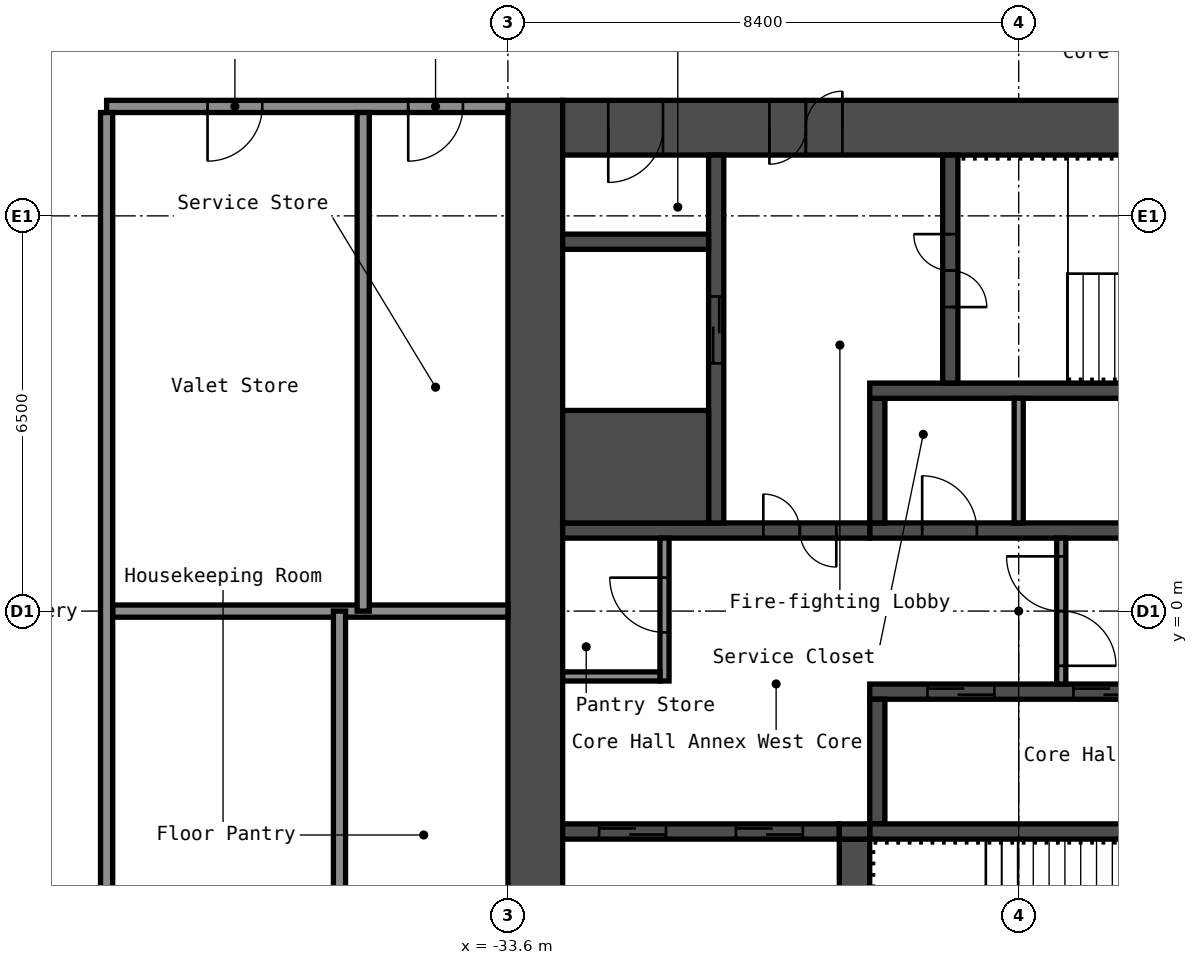
"""IFC4 building model, lengths in metres.
Left out: names, types, materials, properties, quantities, classifications, styles, units other than length and angle.
Written with IfcOpenShell. Run it as: python <this file> out.ifc"""

import sys

from ifc_helpers import new_model, si_unit, direction, frame, frame_2d, origin, place, context, subcontext, project, spatial, rectangle, extrude, element, fill, save


model = new_model("IFC4")
c1 = context("Model", 3, precision=1e-05, world=origin(), true_north=direction((0.0, 1.0)))
c2 = subcontext(c1, "Body", "Model", "MODEL_VIEW")
j1 = project(units=[si_unit("LENGTHUNIT", "METRE"), si_unit("PLANEANGLEUNIT", "RADIAN")], contexts=[c1])
p1 = place(None, origin())
s1 = spatial("IfcSite", under=j1, at=p1, CompositionType="ELEMENT")
p2 = place(p1, origin())
s2 = spatial("IfcBuilding", under=s1, at=p2, CompositionType="ELEMENT")
p3 = place(p2, frame((0.0, 0.0, 143.8)))
s3 = spatial("IfcBuildingStorey", under=s2, at=p3, CompositionType="ELEMENT", Elevation=143.8)
p4 = place(p3, frame((-33.15, -8.4, 0.0), z_axis=(0.0, 0.0, 1.0), x_axis=(0.0, 1.0, 0.0)))
e1 = element("IfcWall", 1, at=p4, inside=s3, PredefinedType="SHEAR", context=c2, shape_type="SweptSolid", body=[
    extrude(rectangle(XDim=16.8, YDim=0.9, at=frame_2d((8.4, 0.0))), origin(), (0.0, 0.0, 1.0), 2.75),
])
p5 = place(p3, frame((-32.7, 7.95, 0.0), z_axis=(0.0, 0.0, 1.0), x_axis=(1.0, 0.0, 0.0)))
e2 = element("IfcWall", 2, at=p5, inside=s3, PredefinedType="SHEAR", context=c2, shape_type="SweptSolid", body=[
    extrude(rectangle(XDim=15.0, YDim=0.9, at=frame_2d((7.5, 0.0))), origin(), (0.0, 0.0, 1.0), 2.75),
])
p6 = place(p5, frame((3.4, 0.0, 0.0)))
e3 = element("IfcOpeningElement", 3, at=p6, cuts=e2, PredefinedType="OPENING", context=c2, shape_type="SweptSolid", body=[
    extrude(rectangle(XDim=1.2, YDim=2.1, at=frame_2d((0.6, 1.05))), frame((0.0, 0.46, 0.0), z_axis=(0.0, -1.0, 0.0), x_axis=(1.0, 0.0, 0.0)), (0.0, 0.0, 1.0), 0.92),
])
p7 = place(p5, frame((0.75, 0.0, 0.0)))
e4 = element("IfcOpeningElement", 4, at=p7, cuts=e2, PredefinedType="OPENING", context=c2, shape_type="SweptSolid", body=[
    extrude(rectangle(XDim=0.9, YDim=2.1, at=frame_2d((0.45, 1.05))), frame((0.0, 0.46, 0.0), z_axis=(0.0, -1.0, 0.0), x_axis=(1.0, 0.0, 0.0)), (0.0, 0.0, 1.0), 0.92),
])
p8 = place(p3, frame((-27.65, 1.325, 0.0), z_axis=(0.0, 0.0, 1.0), x_axis=(1.0, 0.0, 0.0)))
e5 = element("IfcWall", 5, at=p8, inside=s3, PredefinedType="SHEAR", context=c2, shape_type="SweptSolid", body=[
    extrude(rectangle(XDim=7.5, YDim=0.25, at=frame_2d((3.75, 0.0))), origin(), (0.0, 0.0, 1.0), 2.75),
])
p9 = place(p8, frame((4.562, 0.0, 0.0)))
e6 = element("IfcOpeningElement", 6, at=p9, cuts=e5, PredefinedType="OPENING", context=c2, shape_type="SweptSolid", body=[
    extrude(rectangle(XDim=0.9, YDim=2.1, at=frame_2d((0.45, 1.05))), frame((0.0, 0.135, 0.0), z_axis=(0.0, -1.0, 0.0), x_axis=(1.0, 0.0, 0.0)), (0.0, 0.0, 1.0), 0.27),
])
p10 = place(p8, frame((0.863, 0.0, 0.0)))
e7 = element("IfcOpeningElement", 7, at=p10, cuts=e5, PredefinedType="OPENING", context=c2, shape_type="SweptSolid", body=[
    extrude(rectangle(XDim=0.9, YDim=2.1, at=frame_2d((0.45, 1.05))), frame((0.0, 0.135, 0.0), z_axis=(0.0, -1.0, 0.0), x_axis=(1.0, 0.0, 0.0)), (0.0, 0.0, 1.0), 0.27),
])
p11 = place(p3, frame((-27.525, 1.45, 0.0), z_axis=(0.0, 0.0, 1.0), x_axis=(0.0, 1.0, 0.0)))
e8 = element("IfcWall", 8, at=p11, inside=s3, PredefinedType="SHEAR", context=c2, shape_type="SweptSolid", body=[
    extrude(rectangle(XDim=2.05, YDim=0.25, at=frame_2d((1.025, 0.0))), origin(), (0.0, 0.0, 1.0), 2.75),
])
p12 = place(p3, frame((-27.65, 3.625, 0.0), z_axis=(0.0, 0.0, 1.0), x_axis=(1.0, 0.0, 0.0)))
e9 = element("IfcWall", 9, at=p12, inside=s3, PredefinedType="SHEAR", context=c2, shape_type="SweptSolid", body=[
    extrude(rectangle(XDim=7.5, YDim=0.25, at=frame_2d((3.75, 0.0))), origin(), (0.0, 0.0, 1.0), 2.75),
])
p13 = place(p3, frame((-26.325, 3.75, 0.0), z_axis=(0.0, 0.0, 1.0), x_axis=(0.0, 1.0, 0.0)))
e10 = element("IfcWall", 10, at=p13, inside=s3, PredefinedType="SHEAR", context=c2, shape_type="SweptSolid", body=[
    extrude(rectangle(XDim=3.75, YDim=0.25, at=frame_2d((1.875, 0.0))), origin(), (0.0, 0.0, 1.0), 2.75),
])
p14 = place(p13, frame((1.25, 0.0, 0.0)))
e11 = element("IfcOpeningElement", 11, at=p14, cuts=e10, PredefinedType="OPENING", context=c2, shape_type="SweptSolid", body=[
    extrude(rectangle(XDim=1.2, YDim=2.1, at=frame_2d((0.6, 1.05))), frame((0.0, 0.135, 0.0), z_axis=(0.0, -1.0, 0.0), x_axis=(1.0, 0.0, 0.0)), (0.0, 0.0, 1.0), 0.27),
])
p15 = place(p3, frame((-32.7, 1.325, 0.0), z_axis=(0.0, 0.0, 1.0), x_axis=(1.0, 0.0, 0.0)))
e12 = element("IfcWall", 12, at=p15, inside=s3, PredefinedType="SHEAR", context=c2, shape_type="SweptSolid", body=[
    extrude(rectangle(XDim=5.05, YDim=0.25, at=frame_2d((2.525, 0.0))), origin(), (0.0, 0.0, 1.0), 2.75),
])
p16 = place(p15, frame((3.3, 0.0, 0.0)))
e13 = element("IfcOpeningElement", 13, at=p16, cuts=e12, PredefinedType="OPENING", context=c2, shape_type="SweptSolid", body=[
    extrude(rectangle(XDim=1.2, YDim=2.1, at=frame_2d((0.6, 1.05))), frame((0.0, 0.135, 0.0), z_axis=(0.0, -1.0, 0.0), x_axis=(1.0, 0.0, 0.0)), (0.0, 0.0, 1.0), 0.27),
])
p17 = place(p3, frame((-30.175, 1.45, 0.0), z_axis=(0.0, 0.0, 1.0), x_axis=(0.0, 1.0, 0.0)))
e14 = element("IfcWall", 14, at=p17, inside=s3, PredefinedType="SHEAR", context=c2, shape_type="SweptSolid", body=[
    extrude(rectangle(XDim=6.05, YDim=0.25, at=frame_2d((3.025, 0.0))), origin(), (0.0, 0.0, 1.0), 2.75),
])
p18 = place(p17, frame((2.625, 0.0, 0.0)))
e15 = element("IfcOpeningElement", 15, at=p18, cuts=e14, PredefinedType="OPENING", context=c2, shape_type="SweptSolid", body=[
    extrude(rectangle(XDim=1.1, YDim=2.1, at=frame_2d((0.55, 1.05))), frame((0.0, 0.135, 0.0), z_axis=(0.0, -1.0, 0.0), x_axis=(1.0, 0.0, 0.0)), (0.0, 0.0, 1.0), 0.27),
])
p19 = place(p3, frame((-32.7, 2.375, 0.0), z_axis=(0.0, 0.0, 1.0), x_axis=(1.0, 0.0, 0.0)))
e16 = element("IfcWall", 16, at=p19, inside=s3, PredefinedType="SHEAR", context=c2, shape_type="SweptSolid", body=[
    extrude(rectangle(XDim=2.4, YDim=1.85, at=frame_2d((1.2, 0.0))), origin(), (0.0, 0.0, 1.0), 2.75),
])
p20 = place(p3, frame((-32.7, 6.075, 0.0), z_axis=(0.0, 0.0, 1.0), x_axis=(1.0, 0.0, 0.0)))
e17 = element("IfcWall", 17, at=p20, inside=s3, PredefinedType="SHEAR", context=c2, shape_type="SweptSolid", body=[
    extrude(rectangle(XDim=2.4, YDim=0.25, at=frame_2d((1.2, 0.0))), origin(), (0.0, 0.0, 1.0), 2.75),
])
p21 = place(p3, frame((-27.65, -1.325, 0.0), z_axis=(0.0, 0.0, 1.0), x_axis=(1.0, 0.0, 0.0)))
e18 = element("IfcWall", 18, at=p21, inside=s3, PredefinedType="SHEAR", context=c2, shape_type="SweptSolid", body=[
    extrude(rectangle(XDim=7.5, YDim=0.25, at=frame_2d((3.75, 0.0))), origin(), (0.0, 0.0, 1.0), 2.75),
])
p22 = place(p21, frame((5.75, 0.0, 0.0)))
e19 = element("IfcOpeningElement", 19, at=p22, cuts=e18, PredefinedType="OPENING", context=c2, shape_type="SweptSolid", body=[
    extrude(rectangle(XDim=1.1, YDim=2.1, at=frame_2d((0.55, 1.05))), frame((0.0, 0.135, 0.0), z_axis=(0.0, -1.0, 0.0), x_axis=(1.0, 0.0, 0.0)), (0.0, 0.0, 1.0), 0.27),
])
p23 = place(p21, frame((3.35, 0.0, 0.0)))
e20 = element("IfcOpeningElement", 20, at=p23, cuts=e18, PredefinedType="OPENING", context=c2, shape_type="SweptSolid", body=[
    extrude(rectangle(XDim=1.1, YDim=2.1, at=frame_2d((0.55, 1.05))), frame((0.0, 0.135, 0.0), z_axis=(0.0, -1.0, 0.0), x_axis=(1.0, 0.0, 0.0)), (0.0, 0.0, 1.0), 0.27),
])
p24 = place(p21, frame((0.95, 0.0, 0.0)))
e21 = element("IfcOpeningElement", 21, at=p24, cuts=e18, PredefinedType="OPENING", context=c2, shape_type="SweptSolid", body=[
    extrude(rectangle(XDim=1.1, YDim=2.1, at=frame_2d((0.55, 1.05))), frame((0.0, 0.135, 0.0), z_axis=(0.0, -1.0, 0.0), x_axis=(1.0, 0.0, 0.0)), (0.0, 0.0, 1.0), 0.27),
])
p25 = place(p3, frame((-27.525, -3.5, 0.0), z_axis=(0.0, 0.0, 1.0), x_axis=(0.0, 1.0, 0.0)))
e22 = element("IfcWall", 22, at=p25, inside=s3, PredefinedType="SHEAR", context=c2, shape_type="SweptSolid", body=[
    extrude(rectangle(XDim=2.05, YDim=0.25, at=frame_2d((1.025, 0.0))), origin(), (0.0, 0.0, 1.0), 2.75),
])
p26 = place(p3, frame((-27.65, -3.625, 0.0), z_axis=(0.0, 0.0, 1.0), x_axis=(1.0, 0.0, 0.0)))
e23 = element("IfcWall", 23, at=p26, inside=s3, PredefinedType="SHEAR", context=c2, shape_type="SweptSolid", body=[
    extrude(rectangle(XDim=7.5, YDim=0.25, at=frame_2d((3.75, 0.0))), origin(), (0.0, 0.0, 1.0), 2.75),
])
p27 = place(p3, frame((-27.9, -7.5, 0.0), z_axis=(0.0, 0.0, 1.0), x_axis=(0.0, 1.0, 0.0)))
e24 = element("IfcWall", 24, at=p27, inside=s3, PredefinedType="SHEAR", context=c2, shape_type="SweptSolid", body=[
    extrude(rectangle(XDim=3.75, YDim=0.5, at=frame_2d((1.875, 0.0))), origin(), (0.0, 0.0, 1.0), 2.75),
])
p28 = place(p3, frame((-32.7, -3.625, 0.0), z_axis=(0.0, 0.0, 1.0), x_axis=(1.0, 0.0, 0.0)))
e25 = element("IfcWall", 25, at=p28, inside=s3, PredefinedType="SHEAR", context=c2, shape_type="SweptSolid", body=[
    extrude(rectangle(XDim=4.55, YDim=0.25, at=frame_2d((2.275, 0.0))), origin(), (0.0, 0.0, 1.0), 2.75),
])
p29 = place(p28, frame((2.85, 0.0, 0.0)))
e26 = element("IfcOpeningElement", 26, at=p29, cuts=e25, PredefinedType="OPENING", context=c2, shape_type="SweptSolid", body=[
    extrude(rectangle(XDim=1.1, YDim=2.1, at=frame_2d((0.55, 1.05))), frame((0.0, 0.135, 0.0), z_axis=(0.0, -1.0, 0.0), x_axis=(1.0, 0.0, 0.0)), (0.0, 0.0, 1.0), 0.27),
])
p30 = place(p28, frame((0.6, 0.0, 0.0)))
e27 = element("IfcOpeningElement", 27, at=p30, cuts=e25, PredefinedType="OPENING", context=c2, shape_type="SweptSolid", body=[
    extrude(rectangle(XDim=1.1, YDim=2.1, at=frame_2d((0.55, 1.05))), frame((0.0, 0.135, 0.0), z_axis=(0.0, -1.0, 0.0), x_axis=(1.0, 0.0, 0.0)), (0.0, 0.0, 1.0), 0.27),
])
p31 = place(p3, frame((-28.15, -3.625, 0.0), z_axis=(0.0, 0.0, 1.0), x_axis=(1.0, 0.0, 0.0)))
e28 = element("IfcWall", 28, at=p31, inside=s3, PredefinedType="SHEAR", context=c2, shape_type="SweptSolid", body=[
    extrude(rectangle(XDim=0.5, YDim=0.25, at=frame_2d((0.25, 0.0))), origin(), (0.0, 0.0, 1.0), 2.75),
])
p32 = place(p3, frame((-24.5, -1.2, 0.0), z_axis=(0.0, 0.0, 1.0), x_axis=(0.0, 1.0, 0.0)))
e29 = element("IfcWall", 29, at=p32, inside=s3, PredefinedType="PARTITIONING", context=c2, shape_type="SweptSolid", body=[
    extrude(rectangle(XDim=2.4, YDim=0.15, at=frame_2d((1.2, 0.0))), origin(), (0.0, 0.0, 1.0), 2.75),
])
p33 = place(p32, frame((0.3, 0.0, 0.0)))
e30 = element("IfcOpeningElement", 30, at=p33, cuts=e29, PredefinedType="OPENING", context=c2, shape_type="SweptSolid", body=[
    extrude(rectangle(XDim=1.8, YDim=2.1, at=frame_2d((0.9, 1.05))), frame((0.0, 0.085, 0.0), z_axis=(0.0, -1.0, 0.0), x_axis=(1.0, 0.0, 0.0)), (0.0, 0.0, 1.0), 0.17),
])
p34 = place(p3, frame((-31.025, -1.15, 0.0), z_axis=(0.0, 0.0, 1.0), x_axis=(0.0, 1.0, 0.0)))
e31 = element("IfcWall", 31, at=p34, inside=s3, PredefinedType="PARTITIONING", context=c2, shape_type="SweptSolid", body=[
    extrude(rectangle(XDim=2.35, YDim=0.15, at=frame_2d((1.175, 0.0))), origin(), (0.0, 0.0, 1.0), 2.75),
])
p35 = place(p34, frame((0.8, 0.0, 0.0)))
e32 = element("IfcOpeningElement", 32, at=p35, cuts=e31, PredefinedType="OPENING", context=c2, shape_type="SweptSolid", body=[
    extrude(rectangle(XDim=0.9, YDim=2.1, at=frame_2d((0.45, 1.05))), frame((0.0, 0.085, 0.0), z_axis=(0.0, -1.0, 0.0), x_axis=(1.0, 0.0, 0.0)), (0.0, 0.0, 1.0), 0.17),
])
p36 = place(p3, frame((-32.7, -1.075, 0.0), z_axis=(0.0, 0.0, 1.0), x_axis=(1.0, 0.0, 0.0)))
e33 = element("IfcWall", 33, at=p36, inside=s3, PredefinedType="PARTITIONING", context=c2, shape_type="SweptSolid", body=[
    extrude(rectangle(XDim=1.6, YDim=0.15, at=frame_2d((0.8, 0.0))), origin(), (0.0, 0.0, 1.0), 2.75),
])
p37 = place(p3, frame((-25.2, 1.45, 0.0), z_axis=(0.0, 0.0, 1.0), x_axis=(0.0, 1.0, 0.0)))
e34 = element("IfcWall", 34, at=p37, inside=s3, PredefinedType="PARTITIONING", context=c2, shape_type="SweptSolid", body=[
    extrude(rectangle(XDim=2.05, YDim=0.15, at=frame_2d((1.025, 0.0))), origin(), (0.0, 0.0, 1.0), 2.75),
])
p38 = place(p3, frame((-40.1, 0.0, 0.0), z_axis=(0.0, 0.0, 1.0), x_axis=(1.0, 0.0, 0.0)))
e35 = element("IfcWall", 35, at=p38, inside=s3, PredefinedType="PARTITIONING", context=c2, shape_type="SweptSolid", body=[
    extrude(rectangle(XDim=6.5, YDim=0.2, at=frame_2d((3.25, 0.0))), origin(), (0.0, 0.0, 1.0), 2.75),
])
p39 = place(p3, frame((-40.2, 8.3, 0.0), z_axis=(0.0, 0.0, 1.0), x_axis=(1.0, 0.0, 0.0)))
e36 = element("IfcWall", 36, at=p39, inside=s3, PredefinedType="PARTITIONING", context=c2, shape_type="SweptSolid", body=[
    extrude(rectangle(XDim=6.6, YDim=0.2, at=frame_2d((3.3, 0.0))), origin(), (0.0, 0.0, 1.0), 2.75),
])
p40 = place(p39, frame((1.66, 0.0, 0.0)))
e37 = element("IfcOpeningElement", 37, at=p40, cuts=e36, PredefinedType="OPENING", context=c2, shape_type="SweptSolid", body=[
    extrude(rectangle(XDim=0.9, YDim=2.1, at=frame_2d((0.45, 1.05))), frame((0.0, 0.11, 0.0), z_axis=(0.0, -1.0, 0.0), x_axis=(1.0, 0.0, 0.0)), (0.0, 0.0, 1.0), 0.22),
])
p41 = place(p39, frame((4.96, 0.0, 0.0)))
e38 = element("IfcOpeningElement", 38, at=p41, cuts=e36, PredefinedType="OPENING", context=c2, shape_type="SweptSolid", body=[
    extrude(rectangle(XDim=0.9, YDim=2.1, at=frame_2d((0.45, 1.05))), frame((0.0, 0.11, 0.0), z_axis=(0.0, -1.0, 0.0), x_axis=(1.0, 0.0, 0.0)), (0.0, 0.0, 1.0), 0.22),
])
p42 = place(p3, frame((-40.2, -8.2, 0.0), z_axis=(0.0, 0.0, 1.0), x_axis=(0.0, 1.0, 0.0)))
e39 = element("IfcWall", 39, at=p42, inside=s3, PredefinedType="PARTITIONING", context=c2, shape_type="SweptSolid", body=[
    extrude(rectangle(XDim=16.4, YDim=0.2, at=frame_2d((8.2, 0.0))), origin(), (0.0, 0.0, 1.0), 2.75),
])
for number, where, z_axis, x_axis in (
    (40, (-36.37, -8.2, 0.0), (0.0, 0.0, 1.0), (0.0, 1.0, 0.0)),
    (41, (-35.98, 0.0, 0.0), (0.0, 0.0, 1.0), (0.0, 1.0, 0.0)),
):
    element("IfcWall", number, at=place(p3, frame(where, z_axis=z_axis, x_axis=x_axis)), inside=s3, PredefinedType="PARTITIONING", context=c2, shape_type="SweptSolid", body=[
        extrude(rectangle(XDim=8.2, YDim=0.2, at=frame_2d((4.1, 0.0))), origin(), (0.0, 0.0, 1.0), 2.75),
    ])
p43 = place(p6, origin())
e42 = element("IfcDoor", 42, at=p43, inside=s3, OperationType="DOUBLE_DOOR_SINGLE_SWING", PredefinedType="DOOR", context=c2, shape_type="SweptSolid", body=[
    extrude(rectangle(XDim=1.2, YDim=2.1, at=frame_2d((0.6, 1.05))), frame((0.0, 0.025, 0.0), z_axis=(0.0, -1.0, 0.0), x_axis=(1.0, 0.0, 0.0)), (0.0, 0.0, 1.0), 0.05),
])
fill(e3, e42)
p44 = place(p7, origin())
e43 = element("IfcDoor", 43, at=p44, inside=s3, OperationType="SINGLE_SWING_LEFT", PredefinedType="DOOR", context=c2, shape_type="SweptSolid", body=[
    extrude(rectangle(XDim=0.9, YDim=2.1, at=frame_2d((0.45, 1.05))), frame((0.0, 0.025, 0.0), z_axis=(0.0, -1.0, 0.0), x_axis=(1.0, 0.0, 0.0)), (0.0, 0.0, 1.0), 0.05),
])
fill(e4, e43)
p45 = place(p14, origin())
e44 = element("IfcDoor", 44, at=p45, inside=s3, OperationType="DOUBLE_DOOR_SINGLE_SWING", PredefinedType="DOOR", context=c2, shape_type="SweptSolid", body=[
    extrude(rectangle(XDim=1.2, YDim=2.1, at=frame_2d((0.6, 1.05))), frame((0.0, 0.025, 0.0), z_axis=(0.0, -1.0, 0.0), x_axis=(1.0, 0.0, 0.0)), (0.0, 0.0, 1.0), 0.05),
])
fill(e11, e44)
p46 = place(p16, origin())
e45 = element("IfcDoor", 45, at=p46, inside=s3, OperationType="DOUBLE_DOOR_SINGLE_SWING", PredefinedType="DOOR", context=c2, shape_type="SweptSolid", body=[
    extrude(rectangle(XDim=1.2, YDim=2.1, at=frame_2d((0.6, 1.05))), frame((0.0, 0.025, 0.0), z_axis=(0.0, -1.0, 0.0), x_axis=(1.0, 0.0, 0.0)), (0.0, 0.0, 1.0), 0.05),
])
fill(e13, e45)
p47 = place(p33, origin())
e46 = element("IfcDoor", 46, at=p47, inside=s3, OperationType="DOUBLE_DOOR_SINGLE_SWING", PredefinedType="DOOR", context=c2, shape_type="SweptSolid", body=[
    extrude(rectangle(XDim=1.8, YDim=2.1, at=frame_2d((0.9, 1.05))), frame((0.0, 0.025, 0.0), z_axis=(0.0, -1.0, 0.0), x_axis=(1.0, 0.0, 0.0)), (0.0, 0.0, 1.0), 0.05),
])
fill(e30, e46)
p48 = place(p35, origin())
e47 = element("IfcDoor", 47, at=p48, inside=s3, OperationType="SINGLE_SWING_LEFT", PredefinedType="DOOR", context=c2, shape_type="SweptSolid", body=[
    extrude(rectangle(XDim=0.9, YDim=2.1, at=frame_2d((0.45, 1.05))), frame((0.0, 0.025, 0.0), z_axis=(0.0, -1.0, 0.0), x_axis=(1.0, 0.0, 0.0)), (0.0, 0.0, 1.0), 0.05),
])
fill(e32, e47)
p49 = place(p10, origin())
e48 = element("IfcDoor", 48, at=p49, inside=s3, OperationType="SINGLE_SWING_RIGHT", PredefinedType="DOOR", context=c2, shape_type="SweptSolid", body=[
    extrude(rectangle(XDim=0.9, YDim=2.1, at=frame_2d((0.45, 1.05))), frame((0.0, 0.025, 0.0), z_axis=(0.0, -1.0, 0.0), x_axis=(1.0, 0.0, 0.0)), (0.0, 0.0, 1.0), 0.05),
])
fill(e7, e48)
p50 = place(p23, origin())
e49 = element("IfcDoor", 49, at=p50, inside=s3, OperationType="DOUBLE_DOOR_SLIDING", PredefinedType="DOOR", context=c2, shape_type="SweptSolid", body=[
    extrude(rectangle(XDim=1.1, YDim=2.1, at=frame_2d((0.55, 1.05))), frame((0.0, 0.025, 0.0), z_axis=(0.0, -1.0, 0.0), x_axis=(1.0, 0.0, 0.0)), (0.0, 0.0, 1.0), 0.05),
])
fill(e20, e49)
p51 = place(p24, origin())
e50 = element("IfcDoor", 50, at=p51, inside=s3, OperationType="DOUBLE_DOOR_SLIDING", PredefinedType="DOOR", context=c2, shape_type="SweptSolid", body=[
    extrude(rectangle(XDim=1.1, YDim=2.1, at=frame_2d((0.55, 1.05))), frame((0.0, 0.025, 0.0), z_axis=(0.0, -1.0, 0.0), x_axis=(1.0, 0.0, 0.0)), (0.0, 0.0, 1.0), 0.05),
])
fill(e21, e50)
p52 = place(p18, origin())
e51 = element("IfcDoor", 51, at=p52, inside=s3, OperationType="DOUBLE_DOOR_SLIDING", PredefinedType="DOOR", context=c2, shape_type="SweptSolid", body=[
    extrude(rectangle(XDim=1.1, YDim=2.1, at=frame_2d((0.55, 1.05))), frame((0.0, 0.025, 0.0), z_axis=(0.0, -1.0, 0.0), x_axis=(1.0, 0.0, 0.0)), (0.0, 0.0, 1.0), 0.05),
])
fill(e15, e51)
p53 = place(p29, origin())
e52 = element("IfcDoor", 52, at=p53, inside=s3, OperationType="DOUBLE_DOOR_SLIDING", PredefinedType="DOOR", context=c2, shape_type="SweptSolid", body=[
    extrude(rectangle(XDim=1.1, YDim=2.1, at=frame_2d((0.55, 1.05))), frame((0.0, 0.025, 0.0), z_axis=(0.0, -1.0, 0.0), x_axis=(1.0, 0.0, 0.0)), (0.0, 0.0, 1.0), 0.05),
])
fill(e26, e52)
p54 = place(p30, origin())
e53 = element("IfcDoor", 53, at=p54, inside=s3, OperationType="DOUBLE_DOOR_SLIDING", PredefinedType="DOOR", context=c2, shape_type="SweptSolid", body=[
    extrude(rectangle(XDim=1.1, YDim=2.1, at=frame_2d((0.55, 1.05))), frame((0.0, 0.025, 0.0), z_axis=(0.0, -1.0, 0.0), x_axis=(1.0, 0.0, 0.0)), (0.0, 0.0, 1.0), 0.05),
])
fill(e27, e53)
p55 = place(p40, origin())
e54 = element("IfcDoor", 54, at=p55, inside=s3, OperationType="SINGLE_SWING_LEFT", PredefinedType="DOOR", context=c2, shape_type="SweptSolid", body=[
    extrude(rectangle(XDim=0.9, YDim=2.1, at=frame_2d((0.45, 1.05))), frame((0.0, 0.025, 0.0), z_axis=(0.0, -1.0, 0.0), x_axis=(1.0, 0.0, 0.0)), (0.0, 0.0, 1.0), 0.05),
])
fill(e37, e54)
p56 = place(p41, origin())
e55 = element("IfcDoor", 55, at=p56, inside=s3, OperationType="SINGLE_SWING_LEFT", PredefinedType="DOOR", context=c2, shape_type="SweptSolid", body=[
    extrude(rectangle(XDim=0.9, YDim=2.1, at=frame_2d((0.45, 1.05))), frame((0.0, 0.025, 0.0), z_axis=(0.0, -1.0, 0.0), x_axis=(1.0, 0.0, 0.0)), (0.0, 0.0, 1.0), 0.05),
])
fill(e38, e55)
save(model, sys.argv[1])
